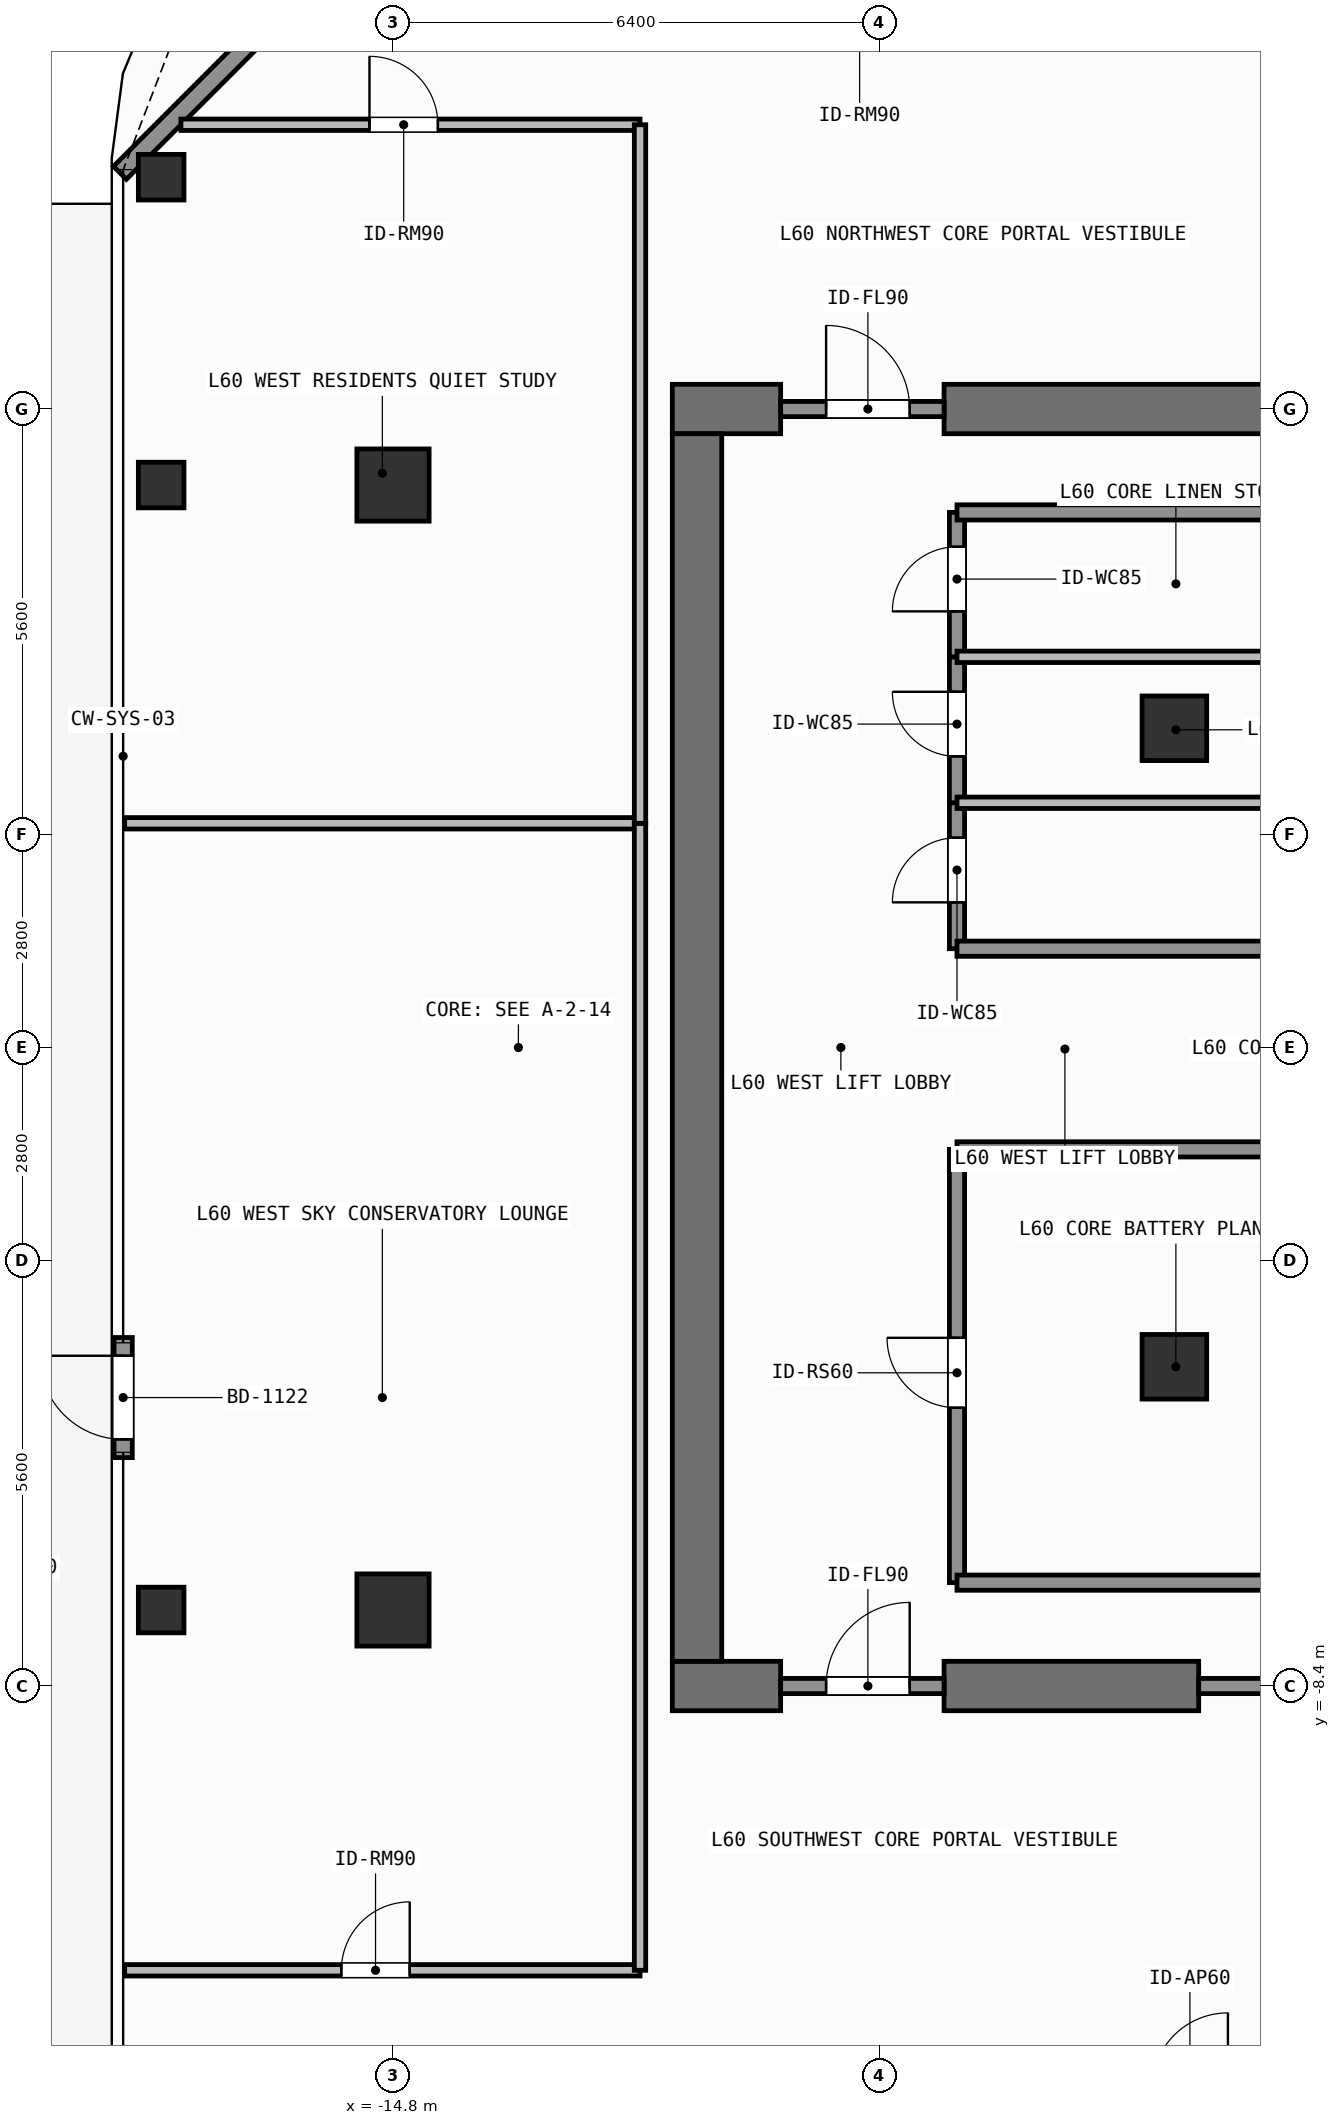
"""IFC4 building model, lengths in metres.
Left out: names, types, materials, properties, quantities, classifications, styles, units other than length and angle.
Written with IfcOpenShell. Run it as: python <this file> out.ifc"""

import sys

from ifc_helpers import new_model, si_unit, direction, frame, frame_2d, origin, origin_2d, place, context, subcontext, project, spatial, rectangle, hollow_rectangle, extrude, element, fill, save


model = new_model("IFC4")
c1 = context("Model", 3, precision=1e-05, world=origin(), true_north=direction((0.0, 1.0)))
c2 = subcontext(c1, "Body", "Model", "MODEL_VIEW")
j1 = project(units=[si_unit("LENGTHUNIT", "METRE"), si_unit("PLANEANGLEUNIT", "RADIAN")], contexts=[c1])
p1 = place(None, origin())
s1 = spatial("IfcSite", under=j1, at=p1, CompositionType="ELEMENT")
p2 = place(p1, origin())
s2 = spatial("IfcBuilding", under=s1, at=p2, CompositionType="ELEMENT")
p3 = place(p2, frame((0.0, 0.0, 246.9)))
s3 = spatial("IfcBuildingStorey", under=s2, at=p3, CompositionType="ELEMENT", Elevation=246.9)
p4 = place(p3, frame((-11.125, -8.4, 0.0), z_axis=(0.0, 0.0, 1.0), x_axis=(1.0, 0.0, 0.0)))
e1 = element("IfcWall", 1, at=p4, inside=s3, PredefinedType="SHEAR", context=c2, shape_type="SweptSolid", body=[
    extrude(rectangle(XDim=1.425, YDim=0.65, at=frame_2d((0.712, 0.0))), origin(), (0.0, 0.0, 1.0), 3.9),
])
p5 = place(p3, frame((-7.55, -8.4, 0.0), z_axis=(0.0, 0.0, 1.0), x_axis=(1.0, 0.0, 0.0)))
e2 = element("IfcWall", 2, at=p5, inside=s3, PredefinedType="SHEAR", context=c2, shape_type="SweptSolid", body=[
    extrude(rectangle(XDim=3.35, YDim=0.65, at=frame_2d((1.675, 0.0))), origin(), (0.0, 0.0, 1.0), 3.9),
])
p6 = place(p3, frame((-11.125, 8.4, 0.0), z_axis=(0.0, 0.0, 1.0), x_axis=(1.0, 0.0, 0.0)))
e3 = element("IfcWall", 3, at=p6, inside=s3, PredefinedType="SHEAR", context=c2, shape_type="SweptSolid", body=[
    extrude(rectangle(XDim=1.425, YDim=0.65, at=frame_2d((0.712, 0.0))), origin(), (0.0, 0.0, 1.0), 3.9),
])
p7 = place(p3, frame((-7.55, 8.4, 0.0), z_axis=(0.0, 0.0, 1.0), x_axis=(1.0, 0.0, 0.0)))
e4 = element("IfcWall", 4, at=p7, inside=s3, PredefinedType="SHEAR", context=c2, shape_type="SweptSolid", body=[
    extrude(rectangle(XDim=16.275, YDim=0.65, at=frame_2d((8.138, 0.0))), origin(), (0.0, 0.0, 1.0), 3.9),
])
p8 = place(p3, frame((-10.8, -8.075, 0.0), z_axis=(0.0, 0.0, 1.0), x_axis=(0.0, 1.0, 0.0)))
e5 = element("IfcWall", 5, at=p8, inside=s3, PredefinedType="SHEAR", context=c2, shape_type="SweptSolid", body=[
    extrude(rectangle(XDim=16.15, YDim=0.65, at=frame_2d((8.075, 0.0))), origin(), (0.0, 0.0, 1.0), 3.9),
])
for number, where, z_axis, x_axis in (
    (6, (-14.8, -7.4, 0.0), (0.0, 0.0, 1.0), (1.0, 0.0, 0.0)),
    (7, (-14.8, 7.4, 0.0), (0.0, 0.0, 1.0), (1.0, 0.0, 0.0)),
):
    element("IfcColumn", number, at=place(p3, frame(where, z_axis=z_axis, x_axis=x_axis)), inside=s3, PredefinedType="COLUMN", context=c2, shape_type="SweptSolid", body=[
        extrude(rectangle(XDim=0.95, YDim=0.95, at=origin_2d()), origin(), (0.0, 0.0, 1.0), 3.9),
    ])
for number, where, z_axis, x_axis in (
    (8, (-4.52, -4.2, 0.0), (0.0, 0.0, 1.0), (1.0, 0.0, 0.0)),
    (9, (-4.52, 4.2, 0.0), (0.0, 0.0, 1.0), (1.0, 0.0, 0.0)),
):
    element("IfcColumn", number, at=place(p3, frame(where, z_axis=z_axis, x_axis=x_axis)), inside=s3, PredefinedType="COLUMN", context=c2, shape_type="SweptSolid", body=[
        extrude(rectangle(XDim=0.85, YDim=0.85, at=origin_2d()), origin(), (0.0, 0.0, 1.0), 3.9),
    ])
for number, where, z_axis, x_axis in (
    (10, (-17.85, 11.45, 0.0), (0.0, 0.0, 1.0), (1.0, 0.0, 0.0)),
    (11, (-17.85, -7.4, 0.0), (0.0, 0.0, 1.0), (1.0, 0.0, 0.0)),
    (12, (-17.85, 7.4, 0.0), (0.0, 0.0, 1.0), (1.0, 0.0, 0.0)),
):
    element("IfcColumn", number, at=place(p3, frame(where, z_axis=z_axis, x_axis=x_axis)), inside=s3, PredefinedType="COLUMN", context=c2, shape_type="SweptSolid", body=[
        extrude(hollow_rectangle(XDim=0.6, YDim=0.6, WallThickness=0.028, at=origin_2d()), origin(), (0.0, 0.0, 1.0), 3.9),
    ])
p9 = place(p3, frame((-18.35, -5.395, 0.0), z_axis=(0.0, 0.0, 1.0), x_axis=(0.0, 1.0, 0.0)))
e13 = element("IfcWall", 13, at=p9, inside=s3, PredefinedType="SOLIDWALL", context=c2, shape_type="SweptSolid", body=[
    extrude(rectangle(XDim=1.58, YDim=0.24, at=frame_2d((0.79, 0.0))), origin(), (0.0, 0.0, 1.0), 3.68),
])
p10 = place(p9, frame((0.24, 0.0, 0.0)))
e14 = element("IfcOpeningElement", 14, at=p10, cuts=e13, PredefinedType="OPENING", context=c2, shape_type="SweptSolid", body=[
    extrude(rectangle(XDim=1.1, YDim=2.2, at=frame_2d((0.55, 1.1))), frame((0.0, 0.13, 0.0), z_axis=(0.0, -1.0, 0.0), x_axis=(1.0, 0.0, 0.0)), (0.0, 0.0, 1.0), 0.26),
])
p11 = place(p3, frame((-18.392, 11.508, 0.0), z_axis=(0.0, 0.0, 1.0), x_axis=(0.707106781187, 0.707106781187, 0.0)))
e15 = element("IfcWall", 15, at=p11, inside=s3, PredefinedType="SOLIDWALL", context=c2, shape_type="SweptSolid", body=[
    extrude(rectangle(XDim=6.201, YDim=0.24, at=frame_2d((3.101, 0.0))), origin(), (0.0, 0.0, 1.0), 3.68),
])
p12 = place(p3, frame((-9.7, -8.4, 0.0), z_axis=(0.0, 0.0, 1.0), x_axis=(1.0, 0.0, 0.0)))
e16 = element("IfcWall", 16, at=p12, inside=s3, PredefinedType="SOLIDWALL", context=c2, shape_type="SweptSolid", body=[
    extrude(rectangle(XDim=2.15, YDim=0.2, at=frame_2d((1.075, 0.0))), origin(), (0.0, 0.0, 1.0), 2.92),
])
p13 = place(p12, frame((0.598, 0.0, 0.0)))
e17 = element("IfcOpeningElement", 17, at=p13, cuts=e16, PredefinedType="OPENING", context=c2, shape_type="SweptSolid", body=[
    extrude(rectangle(XDim=1.1, YDim=2.15, at=frame_2d((0.55, 1.075))), frame((0.0, 0.11, 0.0), z_axis=(0.0, -1.0, 0.0), x_axis=(1.0, 0.0, 0.0)), (0.0, 0.0, 1.0), 0.22),
])
p14 = place(p3, frame((-9.7, 8.4, 0.0), z_axis=(0.0, 0.0, 1.0), x_axis=(1.0, 0.0, 0.0)))
e18 = element("IfcWall", 18, at=p14, inside=s3, PredefinedType="SOLIDWALL", context=c2, shape_type="SweptSolid", body=[
    extrude(rectangle(XDim=2.15, YDim=0.2, at=frame_2d((1.075, 0.0))), origin(), (0.0, 0.0, 1.0), 2.92),
])
p15 = place(p14, frame((0.598, 0.0, 0.0)))
e19 = element("IfcOpeningElement", 19, at=p15, cuts=e18, PredefinedType="OPENING", context=c2, shape_type="SweptSolid", body=[
    extrude(rectangle(XDim=1.1, YDim=2.15, at=frame_2d((0.55, 1.075))), frame((0.0, 0.11, 0.0), z_axis=(0.0, -1.0, 0.0), x_axis=(1.0, 0.0, 0.0)), (0.0, 0.0, 1.0), 0.22),
])
p16 = place(p3, frame((-7.38, -7.04, 0.0), z_axis=(0.0, 0.0, 1.0), x_axis=(0.0, 1.0, 0.0)))
e20 = element("IfcWall", 20, at=p16, inside=s3, PredefinedType="SOLIDWALL", context=c2, shape_type="SweptSolid", body=[
    extrude(rectangle(XDim=5.7, YDim=0.2, at=frame_2d((2.85, 0.0))), origin(), (0.0, 0.0, 1.0), 3.68),
])
p17 = place(p16, frame((2.301, 0.0, 0.0)))
e21 = element("IfcOpeningElement", 21, at=p17, cuts=e20, PredefinedType="OPENING", context=c2, shape_type="SweptSolid", body=[
    extrude(rectangle(XDim=0.92, YDim=2.1, at=frame_2d((0.46, 1.05))), frame((0.0, 0.11, 0.0), z_axis=(0.0, -1.0, 0.0), x_axis=(1.0, 0.0, 0.0)), (0.0, 0.0, 1.0), 0.22),
])
p18 = place(p3, frame((-7.38, 1.3, 0.0), z_axis=(0.0, 0.0, 1.0), x_axis=(0.0, 1.0, 0.0)))
e22 = element("IfcWall", 22, at=p18, inside=s3, PredefinedType="SOLIDWALL", context=c2, shape_type="SweptSolid", body=[
    extrude(rectangle(XDim=1.92, YDim=0.2, at=frame_2d((0.96, 0.0))), origin(), (0.0, 0.0, 1.0), 3.68),
])
p19 = place(p18, frame((0.61, 0.0, 0.0)))
e23 = element("IfcOpeningElement", 23, at=p19, cuts=e22, PredefinedType="OPENING", context=c2, shape_type="SweptSolid", body=[
    extrude(rectangle(XDim=0.85, YDim=2.1, at=frame_2d((0.425, 1.05))), frame((0.0, 0.11, 0.0), z_axis=(0.0, -1.0, 0.0), x_axis=(1.0, 0.0, 0.0)), (0.0, 0.0, 1.0), 0.22),
])
p20 = place(p3, frame((-7.38, 3.22, 0.0), z_axis=(0.0, 0.0, 1.0), x_axis=(0.0, 1.0, 0.0)))
e24 = element("IfcWall", 24, at=p20, inside=s3, PredefinedType="SOLIDWALL", context=c2, shape_type="SweptSolid", body=[
    extrude(rectangle(XDim=1.92, YDim=0.2, at=frame_2d((0.96, 0.0))), origin(), (0.0, 0.0, 1.0), 3.68),
])
p21 = place(p20, frame((0.61, 0.0, 0.0)))
e25 = element("IfcOpeningElement", 25, at=p21, cuts=e24, PredefinedType="OPENING", context=c2, shape_type="SweptSolid", body=[
    extrude(rectangle(XDim=0.85, YDim=2.1, at=frame_2d((0.425, 1.05))), frame((0.0, 0.11, 0.0), z_axis=(0.0, -1.0, 0.0), x_axis=(1.0, 0.0, 0.0)), (0.0, 0.0, 1.0), 0.22),
])
p22 = place(p3, frame((-7.38, 5.14, 0.0), z_axis=(0.0, 0.0, 1.0), x_axis=(0.0, 1.0, 0.0)))
e26 = element("IfcWall", 26, at=p22, inside=s3, PredefinedType="SOLIDWALL", context=c2, shape_type="SweptSolid", body=[
    extrude(rectangle(XDim=1.9, YDim=0.2, at=frame_2d((0.95, 0.0))), origin(), (0.0, 0.0, 1.0), 3.68),
])
p23 = place(p22, frame((0.598, 0.0, 0.0)))
e27 = element("IfcOpeningElement", 27, at=p23, cuts=e26, PredefinedType="OPENING", context=c2, shape_type="SweptSolid", body=[
    extrude(rectangle(XDim=0.85, YDim=2.1, at=frame_2d((0.425, 1.05))), frame((0.0, 0.11, 0.0), z_axis=(0.0, -1.0, 0.0), x_axis=(1.0, 0.0, 0.0)), (0.0, 0.0, 1.0), 0.22),
])
p24 = place(p3, frame((-18.33, -12.14, 0.0), z_axis=(0.0, 0.0, 1.0), x_axis=(1.0, 0.0, 0.0)))
e28 = element("IfcWall", 28, at=p24, inside=s3, PredefinedType="PARTITIONING", context=c2, shape_type="SweptSolid", body=[
    extrude(rectangle(XDim=6.78, YDim=0.15, at=frame_2d((3.39, 0.0))), origin(), (0.0, 0.0, 1.0), 3.68),
])
p25 = place(p24, frame((2.85, 0.0, 0.0)))
e29 = element("IfcOpeningElement", 29, at=p25, cuts=e28, PredefinedType="OPENING", context=c2, shape_type="SweptSolid", body=[
    extrude(rectangle(XDim=0.9, YDim=2.1, at=frame_2d((0.45, 1.05))), frame((0.0, 0.085, 0.0), z_axis=(0.0, -1.0, 0.0), x_axis=(1.0, 0.0, 0.0)), (0.0, 0.0, 1.0), 0.17),
])
p26 = place(p3, frame((-17.59, 12.14, 0.0), z_axis=(0.0, 0.0, 1.0), x_axis=(1.0, 0.0, 0.0)))
e30 = element("IfcWall", 30, at=p26, inside=s3, PredefinedType="PARTITIONING", context=c2, shape_type="SweptSolid", body=[
    extrude(rectangle(XDim=6.04, YDim=0.15, at=frame_2d((3.02, 0.0))), origin(), (0.0, 0.0, 1.0), 3.68),
])
p27 = place(p26, frame((2.481, 0.0, 0.0)))
e31 = element("IfcOpeningElement", 31, at=p27, cuts=e30, PredefinedType="OPENING", context=c2, shape_type="SweptSolid", body=[
    extrude(rectangle(XDim=0.9, YDim=2.1, at=frame_2d((0.45, 1.05))), frame((0.0, 0.085, 0.0), z_axis=(0.0, -1.0, 0.0), x_axis=(1.0, 0.0, 0.0)), (0.0, 0.0, 1.0), 0.17),
])
p28 = place(p3, frame((-4.2, -8.4, 0.0), z_axis=(0.0, 0.0, 1.0), x_axis=(1.0, 0.0, 0.0)))
e32 = element("IfcWall", 32, at=p28, inside=s3, PredefinedType="SOLIDWALL", context=c2, shape_type="SweptSolid", body=[
    extrude(rectangle(XDim=1.58, YDim=0.2, at=frame_2d((0.79, 0.0))), origin(), (0.0, 0.0, 1.0), 2.92),
])
for number, where, z_axis, x_axis in (
    (33, (-7.38, -1.34, 0.0), (0.0, 0.0, 1.0), (1.0, 0.0, 0.0)),
    (34, (-7.38, 1.3, 0.0), (0.0, 0.0, 1.0), (1.0, 0.0, 0.0)),
):
    element("IfcWall", number, at=place(p3, frame(where, z_axis=z_axis, x_axis=x_axis)), inside=s3, PredefinedType="SOLIDWALL", context=c2, shape_type="SweptSolid", body=[
        extrude(rectangle(XDim=6.24, YDim=0.2, at=frame_2d((3.12, 0.0))), origin(), (0.0, 0.0, 1.0), 3.68),
    ])
for number, where, z_axis, x_axis in (
    (35, (-7.38, -7.04, 0.0), (0.0, 0.0, 1.0), (1.0, 0.0, 0.0)),
    (36, (-7.38, 7.04, 0.0), (0.0, 0.0, 1.0), (1.0, 0.0, 0.0)),
):
    element("IfcWall", number, at=place(p3, frame(where, z_axis=z_axis, x_axis=x_axis)), inside=s3, PredefinedType="SOLIDWALL", context=c2, shape_type="SweptSolid", body=[
        extrude(rectangle(XDim=5.8, YDim=0.2, at=frame_2d((2.9, 0.0))), origin(), (0.0, 0.0, 1.0), 3.68),
    ])
for number, where, z_axis, x_axis in (
    (37, (-7.38, 3.22, 0.0), (0.0, 0.0, 1.0), (1.0, 0.0, 0.0)),
    (38, (-7.38, 5.14, 0.0), (0.0, 0.0, 1.0), (1.0, 0.0, 0.0)),
):
    element("IfcWall", number, at=place(p3, frame(where, z_axis=z_axis, x_axis=x_axis)), inside=s3, PredefinedType="PARTITIONING", context=c2, shape_type="SweptSolid", body=[
        extrude(rectangle(XDim=5.8, YDim=0.15, at=frame_2d((2.9, 0.0))), origin(), (0.0, 0.0, 1.0), 3.68),
    ])
p29 = place(p3, frame((-18.33, 2.95, 0.0), z_axis=(0.0, 0.0, 1.0), x_axis=(1.0, 0.0, 0.0)))
e39 = element("IfcWall", 39, at=p29, inside=s3, PredefinedType="PARTITIONING", context=c2, shape_type="SweptSolid", body=[
    extrude(rectangle(XDim=6.78, YDim=0.15, at=frame_2d((3.39, 0.0))), origin(), (0.0, 0.0, 1.0), 3.68),
])
p30 = place(p3, frame((-11.55, -12.14, 0.0), z_axis=(0.0, 0.0, 1.0), x_axis=(0.0, 1.0, 0.0)))
e40 = element("IfcWall", 40, at=p30, inside=s3, PredefinedType="PARTITIONING", context=c2, shape_type="SweptSolid", body=[
    extrude(rectangle(XDim=15.09, YDim=0.15, at=frame_2d((7.545, 0.0))), origin(), (0.0, 0.0, 1.0), 3.68),
])
p31 = place(p3, frame((-11.55, 2.95, 0.0), z_axis=(0.0, 0.0, 1.0), x_axis=(0.0, 1.0, 0.0)))
e41 = element("IfcWall", 41, at=p31, inside=s3, PredefinedType="PARTITIONING", context=c2, shape_type="SweptSolid", body=[
    extrude(rectangle(XDim=9.19, YDim=0.15, at=frame_2d((4.595, 0.0))), origin(), (0.0, 0.0, 1.0), 3.68),
])
p32 = place(p10, origin())
e42 = element("IfcDoor", 42, at=p32, inside=s3, OperationType="SINGLE_SWING_RIGHT", PredefinedType="DOOR", context=c2, shape_type="SweptSolid", body=[
    extrude(rectangle(XDim=1.1, YDim=2.2, at=frame_2d((0.55, 1.1))), frame((0.0, 0.025, 0.0), z_axis=(0.0, -1.0, 0.0), x_axis=(1.0, 0.0, 0.0)), (0.0, 0.0, 1.0), 0.05),
])
fill(e14, e42)
p33 = place(p13, origin())
e43 = element("IfcDoor", 43, at=p33, inside=s3, OperationType="SINGLE_SWING_RIGHT", PredefinedType="DOOR", context=c2, shape_type="SweptSolid", body=[
    extrude(rectangle(XDim=1.1, YDim=2.15, at=frame_2d((0.55, 1.075))), frame((0.0, 0.025, 0.0), z_axis=(0.0, -1.0, 0.0), x_axis=(1.0, 0.0, 0.0)), (0.0, 0.0, 1.0), 0.05),
])
fill(e17, e43)
p34 = place(p15, origin())
e44 = element("IfcDoor", 44, at=p34, inside=s3, OperationType="SINGLE_SWING_LEFT", PredefinedType="DOOR", context=c2, shape_type="SweptSolid", body=[
    extrude(rectangle(XDim=1.1, YDim=2.15, at=frame_2d((0.55, 1.075))), frame((0.0, 0.025, 0.0), z_axis=(0.0, -1.0, 0.0), x_axis=(1.0, 0.0, 0.0)), (0.0, 0.0, 1.0), 0.05),
])
fill(e19, e44)
p35 = place(p17, origin())
e45 = element("IfcDoor", 45, at=p35, inside=s3, OperationType="SINGLE_SWING_RIGHT", PredefinedType="DOOR", context=c2, shape_type="SweptSolid", body=[
    extrude(rectangle(XDim=0.92, YDim=2.1, at=frame_2d((0.46, 1.05))), frame((0.0, 0.025, 0.0), z_axis=(0.0, -1.0, 0.0), x_axis=(1.0, 0.0, 0.0)), (0.0, 0.0, 1.0), 0.05),
])
fill(e21, e45)
p36 = place(p19, origin())
e46 = element("IfcDoor", 46, at=p36, inside=s3, OperationType="SINGLE_SWING_LEFT", PredefinedType="DOOR", context=c2, shape_type="SweptSolid", body=[
    extrude(rectangle(XDim=0.85, YDim=2.1, at=frame_2d((0.425, 1.05))), frame((0.0, 0.025, 0.0), z_axis=(0.0, -1.0, 0.0), x_axis=(1.0, 0.0, 0.0)), (0.0, 0.0, 1.0), 0.05),
])
fill(e23, e46)
p37 = place(p21, origin())
e47 = element("IfcDoor", 47, at=p37, inside=s3, OperationType="SINGLE_SWING_RIGHT", PredefinedType="DOOR", context=c2, shape_type="SweptSolid", body=[
    extrude(rectangle(XDim=0.85, YDim=2.1, at=frame_2d((0.425, 1.05))), frame((0.0, 0.025, 0.0), z_axis=(0.0, -1.0, 0.0), x_axis=(1.0, 0.0, 0.0)), (0.0, 0.0, 1.0), 0.05),
])
fill(e25, e47)
p38 = place(p23, origin())
e48 = element("IfcDoor", 48, at=p38, inside=s3, OperationType="SINGLE_SWING_LEFT", PredefinedType="DOOR", context=c2, shape_type="SweptSolid", body=[
    extrude(rectangle(XDim=0.85, YDim=2.1, at=frame_2d((0.425, 1.05))), frame((0.0, 0.025, 0.0), z_axis=(0.0, -1.0, 0.0), x_axis=(1.0, 0.0, 0.0)), (0.0, 0.0, 1.0), 0.05),
])
fill(e27, e48)
p39 = place(p25, origin())
e49 = element("IfcDoor", 49, at=p39, inside=s3, OperationType="SINGLE_SWING_RIGHT", PredefinedType="DOOR", context=c2, shape_type="SweptSolid", body=[
    extrude(rectangle(XDim=0.9, YDim=2.1, at=frame_2d((0.45, 1.05))), frame((0.0, 0.025, 0.0), z_axis=(0.0, -1.0, 0.0), x_axis=(1.0, 0.0, 0.0)), (0.0, 0.0, 1.0), 0.05),
])
fill(e29, e49)
p40 = place(p27, origin())
e50 = element("IfcDoor", 50, at=p40, inside=s3, OperationType="SINGLE_SWING_LEFT", PredefinedType="DOOR", context=c2, shape_type="SweptSolid", body=[
    extrude(rectangle(XDim=0.9, YDim=2.1, at=frame_2d((0.45, 1.05))), frame((0.0, 0.025, 0.0), z_axis=(0.0, -1.0, 0.0), x_axis=(1.0, 0.0, 0.0)), (0.0, 0.0, 1.0), 0.05),
])
fill(e31, e50)
save(model, sys.argv[1])
